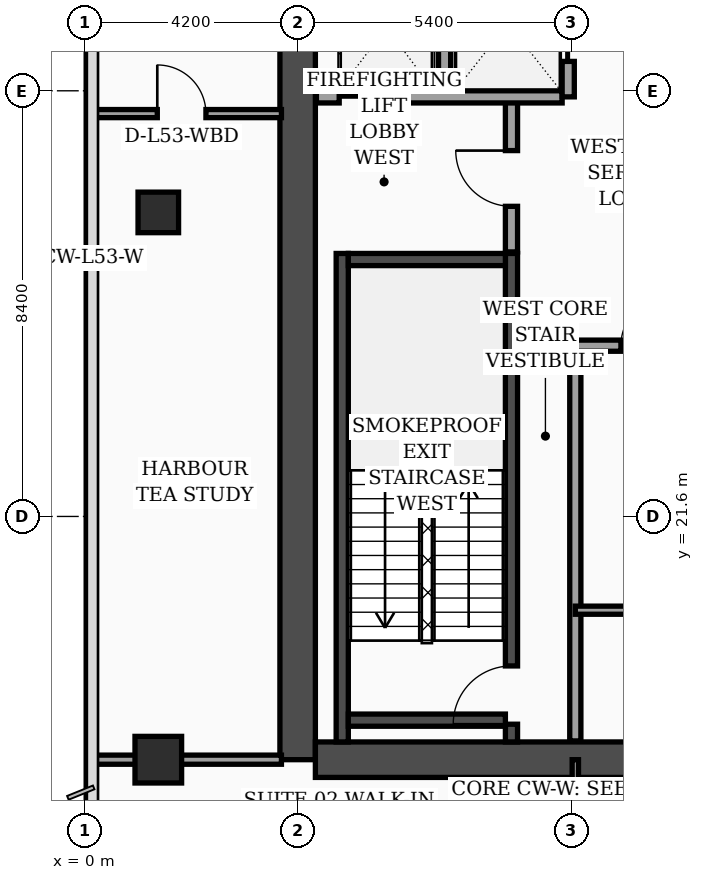
"""IFC4 building model, lengths in metres.
Left out: names, types, materials, properties, quantities, classifications, styles, units other than length and angle.
Written with IfcOpenShell. Run it as: python <this file> out.ifc"""

import sys

from ifc_helpers import new_model, si_unit, direction, frame, frame_2d, origin, origin_2d, place, context, subcontext, project, spatial, rectangle, extrude, element, fill, save


model = new_model("IFC4")
c1 = context("Model", 3, precision=1e-05, world=origin(), true_north=direction((0.0, 1.0)))
c2 = subcontext(c1, "Body", "Model", "MODEL_VIEW")
j1 = project(units=[si_unit("LENGTHUNIT", "METRE"), si_unit("PLANEANGLEUNIT", "RADIAN")], contexts=[c1])
p1 = place(None, origin())
s1 = spatial("IfcSite", under=j1, at=p1, CompositionType="ELEMENT")
p2 = place(p1, origin())
s2 = spatial("IfcBuilding", under=s1, at=p2, CompositionType="ELEMENT")
p3 = place(p2, frame((0.0, 0.0, 214.8)))
s3 = spatial("IfcBuildingStorey", under=s2, at=p3, CompositionType="ELEMENT", Elevation=214.8)
p4 = place(p3, frame((4.2, 16.8, 0.0), z_axis=(0.0, 0.0, 1.0), x_axis=(0.0, 1.0, 0.0)))
e1 = element("IfcWall", 1, at=p4, inside=s3, PredefinedType="SHEAR", context=c2, shape_type="SweptSolid", body=[
    extrude(rectangle(XDim=21.6, YDim=0.7, at=frame_2d((10.8, 0.0))), origin(), (0.0, 0.0, 1.0), 4.05),
])
p5 = place(p3, frame((4.55, 16.8, 0.0), z_axis=(0.0, 0.0, 1.0), x_axis=(1.0, 0.0, 0.0)))
e2 = element("IfcWall", 2, at=p5, inside=s3, PredefinedType="SHEAR", context=c2, shape_type="SweptSolid", body=[
    extrude(rectangle(XDim=10.1, YDim=0.7, at=frame_2d((5.05, 0.0))), origin(), (0.0, 0.0, 1.0), 4.05),
])
p6 = place(p3, frame((5.08, 17.15, 0.0), z_axis=(0.0, 0.0, 1.0), x_axis=(0.0, 1.0, 0.0)))
e3 = element("IfcWall", 3, at=p6, inside=s3, PredefinedType="SOLIDWALL", context=c2, shape_type="SweptSolid", body=[
    extrude(rectangle(XDim=9.64, YDim=0.24, at=frame_2d((4.82, 0.0))), origin(), (0.0, 0.0, 1.0), 4.05),
])
p7 = place(p3, frame((8.42, 17.15, 0.0), z_axis=(0.0, 0.0, 1.0), x_axis=(0.0, 1.0, 0.0)))
e4 = element("IfcWall", 4, at=p7, inside=s3, PredefinedType="SOLIDWALL", context=c2, shape_type="SweptSolid", body=[
    extrude(rectangle(XDim=9.64, YDim=0.24, at=frame_2d((4.82, 0.0))), origin(), (0.0, 0.0, 1.0), 4.05),
])
p8 = place(p7, frame((0.35, 0.0, 0.0)))
e5 = element("IfcOpeningElement", 5, at=p8, cuts=e4, PredefinedType="OPENING", context=c2, shape_type="SweptSolid", body=[
    extrude(rectangle(XDim=1.15, YDim=2.2, at=frame_2d((0.575, 1.1))), frame((0.0, 0.13, 0.0), z_axis=(0.0, -1.0, 0.0), x_axis=(1.0, 0.0, 0.0)), (0.0, 0.0, 1.0), 0.26),
])
for number, where, z_axis, x_axis in (
    (6, (5.2, 17.58, 0.0), (0.0, 0.0, 1.0), (1.0, 0.0, 0.0)),
    (7, (5.2, 26.67, 0.0), (0.0, 0.0, 1.0), (1.0, 0.0, 0.0)),
):
    element("IfcWall", number, at=place(p3, frame(where, z_axis=z_axis, x_axis=x_axis)), inside=s3, PredefinedType="SOLIDWALL", context=c2, shape_type="SweptSolid", body=[
        extrude(rectangle(XDim=3.1, YDim=0.24, at=frame_2d((1.55, 0.0))), origin(), (0.0, 0.0, 1.0), 4.05),
    ])
p9 = place(p3, frame((1.45, 16.8, 0.0), z_axis=(0.0, 0.0, 1.0), x_axis=(1.0, 0.0, 0.0)))
e8 = element("IfcColumn", 8, at=p9, inside=s3, PredefinedType="COLUMN", context=c2, shape_type="SweptSolid", body=[
    extrude(rectangle(XDim=0.92, YDim=0.92, at=origin_2d()), origin(), (0.0, 0.0, 1.0), 4.05),
])
p10 = place(p3, frame((1.45, 27.6, 0.0), z_axis=(0.0, 0.0, 1.0), x_axis=(1.0, 0.0, 0.0)))
e9 = element("IfcColumn", 9, at=p10, inside=s3, PredefinedType="COLUMN", context=c2, shape_type="SweptSolid", body=[
    extrude(rectangle(XDim=0.8, YDim=0.8, at=origin_2d()), origin(), (0.0, 0.0, 1.0), 4.05),
])
p11 = place(p3, frame((8.42, 26.82, 0.0), z_axis=(0.0, 0.0, 1.0), x_axis=(0.0, 1.0, 0.0)))
e10 = element("IfcWall", 10, at=p11, inside=s3, PredefinedType="SOLIDWALL", context=c2, shape_type="SweptSolid", body=[
    extrude(rectangle(XDim=3.0, YDim=0.24, at=frame_2d((1.5, 0.0))), origin(), (0.0, 0.0, 1.0), 4.05),
])
p12 = place(p11, frame((0.9, 0.0, 0.0)))
e11 = element("IfcOpeningElement", 11, at=p12, cuts=e10, PredefinedType="OPENING", context=c2, shape_type="SweptSolid", body=[
    extrude(rectangle(XDim=1.1, YDim=2.2, at=frame_2d((0.55, 1.1))), frame((0.0, 0.13, 0.0), z_axis=(0.0, -1.0, 0.0), x_axis=(1.0, 0.0, 0.0)), (0.0, 0.0, 1.0), 0.26),
])
p13 = place(p3, frame((4.57, 29.88, 0.0), z_axis=(0.0, 0.0, 1.0), x_axis=(1.0, 0.0, 0.0)))
e12 = element("IfcWall", 12, at=p13, inside=s3, PredefinedType="SOLIDWALL", context=c2, shape_type="SweptSolid", body=[
    extrude(rectangle(XDim=4.85, YDim=0.24, at=frame_2d((2.425, 0.0))), origin(), (0.0, 0.0, 1.0), 4.05),
])
p14 = place(p13, frame((0.45, 0.0, 0.0)))
e13 = element("IfcOpeningElement", 13, at=p14, cuts=e12, PredefinedType="OPENING", context=c2, shape_type="SweptSolid", body=[
    extrude(rectangle(XDim=1.3, YDim=2.35, at=frame_2d((0.65, 1.175))), frame((0.0, 0.13, 0.0), z_axis=(0.0, -1.0, 0.0), x_axis=(1.0, 0.0, 0.0)), (0.0, 0.0, 1.0), 0.26),
])
p15 = place(p3, frame((7.1, 30.02, 0.0), z_axis=(0.0, 0.0, 1.0), x_axis=(0.0, 1.0, 0.0)))
e14 = element("IfcWall", 14, at=p15, inside=s3, PredefinedType="SOLIDWALL", context=c2, shape_type="SweptSolid", body=[
    extrude(rectangle(XDim=2.63, YDim=0.24, at=frame_2d((1.315, 0.0))), origin(), (0.0, 0.0, 1.0), 4.05),
])
p16 = place(p3, frame((9.54, 29.88, 0.0), z_axis=(0.0, 0.0, 1.0), x_axis=(0.0, 1.0, 0.0)))
e15 = element("IfcWall", 15, at=p16, inside=s3, PredefinedType="SOLIDWALL", context=c2, shape_type="SweptSolid", body=[
    extrude(rectangle(XDim=2.9, YDim=0.24, at=frame_2d((1.45, 0.0))), origin(), (0.0, 0.0, 1.0), 4.05),
])
p17 = place(p16, frame((0.7, 0.0, 0.0)))
e16 = element("IfcOpeningElement", 16, at=p17, cuts=e15, PredefinedType="OPENING", context=c2, shape_type="SweptSolid", body=[
    extrude(rectangle(XDim=1.3, YDim=2.35, at=frame_2d((0.65, 1.175))), frame((0.0, 0.13, 0.0), z_axis=(0.0, -1.0, 0.0), x_axis=(1.0, 0.0, 0.0)), (0.0, 0.0, 1.0), 0.26),
])
p18 = place(p3, frame((9.68, 17.17, 0.0), z_axis=(0.0, 0.0, 1.0), x_axis=(0.0, 1.0, 0.0)))
e17 = element("IfcWall", 17, at=p18, inside=s3, PredefinedType="SOLIDWALL", context=c2, shape_type="SweptSolid", body=[
    extrude(rectangle(XDim=7.83, YDim=0.22, at=frame_2d((3.915, 0.0))), origin(), (0.0, 0.0, 1.0), 4.05),
])
p19 = place(p3, frame((9.68, 19.75, 0.0), z_axis=(0.0, 0.0, 1.0), x_axis=(1.0, 0.0, 0.0)))
e18 = element("IfcWall", 18, at=p19, inside=s3, PredefinedType="PARTITIONING", context=c2, shape_type="SweptSolid", body=[
    extrude(rectangle(XDim=4.95, YDim=0.16, at=frame_2d((2.475, 0.0))), origin(), (0.0, 0.0, 1.0), 4.05),
])
p20 = place(p19, frame((1.1, 0.0, 0.0)))
e19 = element("IfcOpeningElement", 19, at=p20, cuts=e18, PredefinedType="OPENING", context=c2, shape_type="SweptSolid", body=[
    extrude(rectangle(XDim=0.98, YDim=2.15, at=frame_2d((0.49, 1.075))), frame((0.0, 0.09, 0.0), z_axis=(0.0, -1.0, 0.0), x_axis=(1.0, 0.0, 0.0)), (0.0, 0.0, 1.0), 0.18),
])
p21 = place(p3, frame((9.68, 24.97, 0.0), z_axis=(0.0, 0.0, 1.0), x_axis=(1.0, 0.0, 0.0)))
e20 = element("IfcWall", 20, at=p21, inside=s3, PredefinedType="SOLIDWALL", context=c2, shape_type="SweptSolid", body=[
    extrude(rectangle(XDim=4.95, YDim=0.22, at=frame_2d((2.475, 0.0))), origin(), (0.0, 0.0, 1.0), 3.45),
])
p22 = place(p21, frame((0.9, 0.0, 0.0)))
e21 = element("IfcOpeningElement", 21, at=p22, cuts=e20, PredefinedType="OPENING", context=c2, shape_type="SweptSolid", body=[
    extrude(rectangle(XDim=0.98, YDim=2.15, at=frame_2d((0.49, 1.075))), frame((0.0, 0.12, 0.0), z_axis=(0.0, -1.0, 0.0), x_axis=(1.0, 0.0, 0.0)), (0.0, 0.0, 1.0), 0.24),
])
p23 = place(p3, frame((0.08, 29.55, 0.0), z_axis=(0.0, 0.0, 1.0), x_axis=(1.0, 0.0, 0.0)))
e22 = element("IfcWall", 22, at=p23, inside=s3, PredefinedType="PARTITIONING", context=c2, shape_type="SweptSolid", body=[
    extrude(rectangle(XDim=3.8, YDim=0.16, at=frame_2d((1.9, 0.0))), origin(), (0.0, 0.0, 1.0), 3.6),
])
p24 = place(p23, frame((1.35, 0.0, 0.0)))
e23 = element("IfcOpeningElement", 23, at=p24, cuts=e22, PredefinedType="OPENING", context=c2, shape_type="SweptSolid", body=[
    extrude(rectangle(XDim=0.96, YDim=2.2, at=frame_2d((0.48, 1.1))), frame((0.0, 0.09, 0.0), z_axis=(0.0, -1.0, 0.0), x_axis=(1.0, 0.0, 0.0)), (0.0, 0.0, 1.0), 0.18),
])
p25 = place(p3, frame((0.08, 16.8, 0.0), z_axis=(0.0, 0.0, 1.0), x_axis=(1.0, 0.0, 0.0)))
e24 = element("IfcWall", 24, at=p25, inside=s3, PredefinedType="PARTITIONING", context=c2, shape_type="SweptSolid", body=[
    extrude(rectangle(XDim=3.8, YDim=0.18, at=frame_2d((1.9, 0.0))), origin(), (0.0, 0.0, 1.0), 3.45),
])
p26 = place(p3, frame((9.68, 14.67, 0.0), z_axis=(0.0, 0.0, 1.0), x_axis=(0.0, 1.0, 0.0)))
e25 = element("IfcWall", 25, at=p26, inside=s3, PredefinedType="PARTITIONING", context=c2, shape_type="SweptSolid", body=[
    extrude(rectangle(XDim=2.13, YDim=0.125, at=frame_2d((1.065, 0.0))), origin(), (0.0, 0.0, 1.0), 4.05),
])
p27 = place(p12, origin())
e26 = element("IfcDoor", 26, at=p27, inside=s3, OperationType="SINGLE_SWING_RIGHT", PredefinedType="DOOR", context=c2, shape_type="SweptSolid", body=[
    extrude(rectangle(XDim=1.1, YDim=2.2, at=frame_2d((0.55, 1.1))), frame((0.0, 0.025, 0.0), z_axis=(0.0, -1.0, 0.0), x_axis=(1.0, 0.0, 0.0)), (0.0, 0.0, 1.0), 0.05),
])
fill(e11, e26)
p28 = place(p14, origin())
e27 = element("IfcDoor", 27, at=p28, inside=s3, OperationType="DOUBLE_DOOR_SLIDING", PredefinedType="DOOR", context=c2, shape_type="SweptSolid", body=[
    extrude(rectangle(XDim=1.3, YDim=2.35, at=frame_2d((0.65, 1.175))), frame((0.0, 0.025, 0.0), z_axis=(0.0, -1.0, 0.0), x_axis=(1.0, 0.0, 0.0)), (0.0, 0.0, 1.0), 0.05),
])
fill(e13, e27)
p29 = place(p17, origin())
e28 = element("IfcDoor", 28, at=p29, inside=s3, OperationType="DOUBLE_DOOR_SLIDING", PredefinedType="DOOR", context=c2, shape_type="SweptSolid", body=[
    extrude(rectangle(XDim=1.3, YDim=2.35, at=frame_2d((0.65, 1.175))), frame((0.0, 0.025, 0.0), z_axis=(0.0, -1.0, 0.0), x_axis=(1.0, 0.0, 0.0)), (0.0, 0.0, 1.0), 0.05),
])
fill(e16, e28)
p30 = place(p22, origin())
e29 = element("IfcDoor", 29, at=p30, inside=s3, OperationType="SINGLE_SWING_RIGHT", PredefinedType="DOOR", context=c2, shape_type="SweptSolid", body=[
    extrude(rectangle(XDim=0.98, YDim=2.15, at=frame_2d((0.49, 1.075))), frame((0.0, 0.025, 0.0), z_axis=(0.0, -1.0, 0.0), x_axis=(1.0, 0.0, 0.0)), (0.0, 0.0, 1.0), 0.05),
])
fill(e21, e29)
p31 = place(p24, origin())
e30 = element("IfcDoor", 30, at=p31, inside=s3, OperationType="SINGLE_SWING_LEFT", PredefinedType="DOOR", context=c2, shape_type="SweptSolid", body=[
    extrude(rectangle(XDim=0.96, YDim=2.2, at=frame_2d((0.48, 1.1))), frame((0.0, 0.025, 0.0), z_axis=(0.0, -1.0, 0.0), x_axis=(1.0, 0.0, 0.0)), (0.0, 0.0, 1.0), 0.05),
])
fill(e23, e30)
p32 = place(p8, origin())
e31 = element("IfcDoor", 31, at=p32, inside=s3, OperationType="SINGLE_SWING_LEFT", PredefinedType="DOOR", context=c2, shape_type="SweptSolid", body=[
    extrude(rectangle(XDim=1.15, YDim=2.2, at=frame_2d((0.575, 1.1))), frame((0.0, 0.025, 0.0), z_axis=(0.0, -1.0, 0.0), x_axis=(1.0, 0.0, 0.0)), (0.0, 0.0, 1.0), 0.05),
])
fill(e5, e31)
save(model, sys.argv[1])
